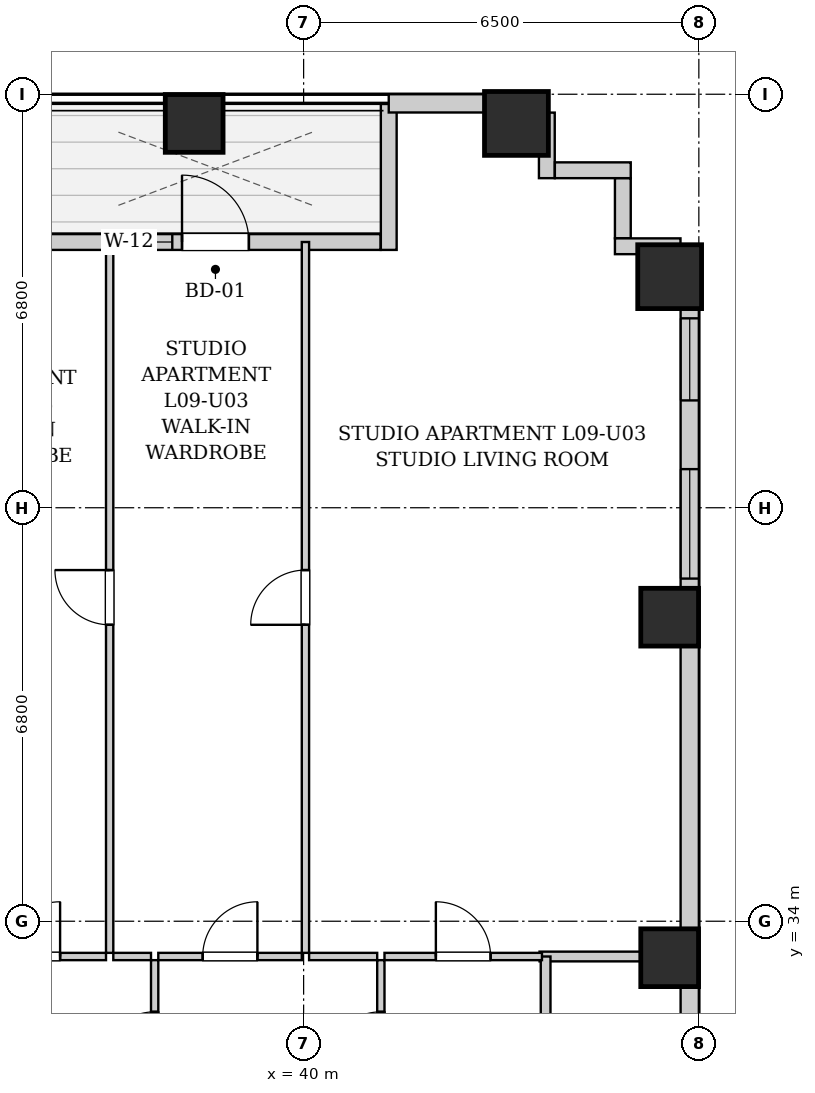
"""IFC4 building model, lengths in metres.
Left out: names, types, materials, properties, quantities, classifications, styles, units other than length and angle.
Written with IfcOpenShell. Run it as: python <this file> out.ifc"""

import sys

from ifc_helpers import new_model, si_unit, direction, frame, frame_2d, origin, origin_2d, place, context, subcontext, project, spatial, rectangle, extrude, element, fill, save


model = new_model("IFC4")
c1 = context("Model", 3, precision=1e-05, world=origin(), true_north=direction((0.0, 1.0)))
c2 = subcontext(c1, "Body", "Model", "MODEL_VIEW")
j1 = project(units=[si_unit("LENGTHUNIT", "METRE"), si_unit("PLANEANGLEUNIT", "RADIAN")], contexts=[c1])
p1 = place(None, origin())
s1 = spatial("IfcSite", under=j1, at=p1, CompositionType="ELEMENT")
p2 = place(p1, origin())
s2 = spatial("IfcBuilding", under=s1, at=p2, CompositionType="ELEMENT")
p3 = place(p2, frame((0.0, 0.0, 38.6)))
s3 = spatial("IfcBuildingStorey", under=s2, at=p3, CompositionType="ELEMENT", Elevation=38.6)
p4 = place(p3, frame((38.2, 47.12, 0.0), z_axis=(0.0, 0.0, 1.0), x_axis=(1.0, 0.0, 0.0)))
e1 = element("IfcColumn", 1, at=p4, inside=s3, PredefinedType="COLUMN", context=c2, shape_type="SweptSolid", body=[
    extrude(rectangle(XDim=0.95, YDim=0.95, at=origin_2d()), origin(), (0.0, 0.0, 1.0), 3.2),
])
p5 = place(p3, frame((43.5, 47.12, 0.0), z_axis=(0.0, 0.0, 1.0), x_axis=(1.0, 0.0, 0.0)))
e2 = element("IfcColumn", 2, at=p5, inside=s3, PredefinedType="COLUMN", context=c2, shape_type="SweptSolid", body=[
    extrude(rectangle(XDim=1.05, YDim=1.05, at=origin_2d()), origin(), (0.0, 0.0, 1.0), 3.2),
])
for number, where, z_axis, x_axis in (
    (3, (46.02, 33.4, 0.0), (0.0, 0.0, 1.0), (1.0, 0.0, 0.0)),
    (4, (46.02, 39.0, 0.0), (0.0, 0.0, 1.0), (1.0, 0.0, 0.0)),
):
    element("IfcColumn", number, at=place(p3, frame(where, z_axis=z_axis, x_axis=x_axis)), inside=s3, PredefinedType="COLUMN", context=c2, shape_type="SweptSolid", body=[
        extrude(rectangle(XDim=0.95, YDim=0.95, at=origin_2d()), origin(), (0.0, 0.0, 1.0), 3.2),
    ])
p6 = place(p3, frame((46.02, 44.6, 0.0), z_axis=(0.0, 0.0, 1.0), x_axis=(1.0, 0.0, 0.0)))
e5 = element("IfcColumn", 5, at=p6, inside=s3, PredefinedType="COLUMN", context=c2, shape_type="SweptSolid", body=[
    extrude(rectangle(XDim=1.05, YDim=1.05, at=origin_2d()), origin(), (0.0, 0.0, 1.0), 3.2),
])
p7 = place(p3, frame((35.834, 45.17, 0.0), z_axis=(0.0, 0.0, 1.0), x_axis=(1.0, 0.0, 0.0)))
e6 = element("IfcWall", 6, at=p7, inside=s3, PredefinedType="SOLIDWALL", context=c2, shape_type="SweptSolid", body=[
    extrude(rectangle(XDim=5.432, YDim=0.26, at=frame_2d((2.716, 0.0))), origin(), (0.0, 0.0, 1.0), 2.94),
])
p8 = place(p7, frame((2.166, 0.0, 0.0)))
e7 = element("IfcOpeningElement", 7, at=p8, cuts=e6, PredefinedType="OPENING", context=c2, shape_type="SweptSolid", body=[
    extrude(rectangle(XDim=1.1, YDim=2.0, at=frame_2d((0.55, 1.0))), frame((0.0, 0.14, 0.0), z_axis=(0.0, -1.0, 0.0), x_axis=(1.0, 0.0, 0.0)), (0.0, 0.0, 1.0), 0.28),
])
p9 = place(p7, frame((1.326, 0.0, 0.55)))
e8 = element("IfcOpeningElement", 8, at=p9, cuts=e6, PredefinedType="OPENING", context=c2, shape_type="SweptSolid", body=[
    extrude(rectangle(XDim=0.68, YDim=1.2, at=frame_2d((0.34, 0.6))), frame((0.0, 0.14, 0.0), z_axis=(0.0, -1.0, 0.0), x_axis=(1.0, 0.0, 0.0)), (0.0, 0.0, 1.0), 0.28),
])
p10 = place(p3, frame((41.4, 45.04, 0.0), z_axis=(0.0, 0.0, 1.0), x_axis=(0.0, 1.0, 0.0)))
e9 = element("IfcWall", 9, at=p10, inside=s3, PredefinedType="SOLIDWALL", context=c2, shape_type="SweptSolid", body=[
    extrude(rectangle(XDim=2.4, YDim=0.26, at=frame_2d((1.2, 0.0))), origin(), (0.0, 0.0, 1.0), 2.94),
])
p11 = place(p3, frame((41.4, 47.45, 0.0), z_axis=(0.0, 0.0, 1.0), x_axis=(1.0, 0.0, 0.0)))
e10 = element("IfcWall", 10, at=p11, inside=s3, PredefinedType="SOLIDWALL", context=c2, shape_type="SweptSolid", body=[
    extrude(rectangle(XDim=2.6, YDim=0.3, at=frame_2d((1.3, 0.0))), origin(), (0.0, 0.0, 1.0), 1.975),
])
p12 = place(p3, frame((46.35, 45.1, 0.0), z_axis=(0.0, 0.0, 1.0), x_axis=(0.0, -1.0, 0.0)))
e11 = element("IfcWall", 11, at=p12, inside=s3, PredefinedType="SOLIDWALL", context=c2, shape_type="SweptSolid", body=[
    extrude(rectangle(XDim=42.6, YDim=0.3, at=frame_2d((21.3, 0.0))), origin(), (0.0, 0.0, 1.0), 1.975),
])
p13 = place(p12, frame((37.575, 0.0, 0.55)))
e12 = element("IfcOpeningElement", 12, at=p13, cuts=e11, PredefinedType="OPENING", context=c2, shape_type="SweptSolid", body=[
    extrude(rectangle(XDim=1.8, YDim=1.2, at=frame_2d((0.9, 0.6))), frame((0.0, 0.16, 0.0), z_axis=(0.0, -1.0, 0.0), x_axis=(1.0, 0.0, 0.0)), (0.0, 0.0, 1.0), 0.32),
])
p14 = place(p12, frame((34.85, 0.0, 0.55)))
e13 = element("IfcOpeningElement", 13, at=p14, cuts=e11, PredefinedType="OPENING", context=c2, shape_type="SweptSolid", body=[
    extrude(rectangle(XDim=1.35, YDim=1.2, at=frame_2d((0.675, 0.6))), frame((0.0, 0.16, 0.0), z_axis=(0.0, -1.0, 0.0), x_axis=(1.0, 0.0, 0.0)), (0.0, 0.0, 1.0), 0.32),
])
p15 = place(p12, frame((3.665, 0.0, 0.55)))
e14 = element("IfcOpeningElement", 14, at=p15, cuts=e11, PredefinedType="OPENING", context=c2, shape_type="SweptSolid", body=[
    extrude(rectangle(XDim=1.8, YDim=1.2, at=frame_2d((0.9, 0.6))), frame((0.0, 0.16, 0.0), z_axis=(0.0, -1.0, 0.0), x_axis=(1.0, 0.0, 0.0)), (0.0, 0.0, 1.0), 0.32),
])
p16 = place(p12, frame((1.185, 0.0, 0.55)))
e15 = element("IfcOpeningElement", 15, at=p16, cuts=e11, PredefinedType="OPENING", context=c2, shape_type="SweptSolid", body=[
    extrude(rectangle(XDim=1.35, YDim=1.2, at=frame_2d((0.675, 0.6))), frame((0.0, 0.16, 0.0), z_axis=(0.0, -1.0, 0.0), x_axis=(1.0, 0.0, 0.0)), (0.0, 0.0, 1.0), 0.32),
])
p17 = place(p12, frame((27.225, 0.0, 0.55)))
e16 = element("IfcOpeningElement", 16, at=p17, cuts=e11, PredefinedType="OPENING", context=c2, shape_type="SweptSolid", body=[
    extrude(rectangle(XDim=1.8, YDim=1.2, at=frame_2d((0.9, 0.6))), frame((0.0, 0.16, 0.0), z_axis=(0.0, -1.0, 0.0), x_axis=(1.0, 0.0, 0.0)), (0.0, 0.0, 1.0), 0.32),
])
p18 = place(p12, frame((17.1, 0.0, 0.55)))
e17 = element("IfcOpeningElement", 17, at=p18, cuts=e11, PredefinedType="OPENING", context=c2, shape_type="SweptSolid", body=[
    extrude(rectangle(XDim=1.8, YDim=1.2, at=frame_2d((0.9, 0.6))), frame((0.0, 0.16, 0.0), z_axis=(0.0, -1.0, 0.0), x_axis=(1.0, 0.0, 0.0)), (0.0, 0.0, 1.0), 0.32),
])
p19 = place(p3, frame((44.0, 47.298, 0.0), z_axis=(0.0, 0.0, 1.0), x_axis=(0.0, -1.0, 0.0)))
e18 = element("IfcWall", 18, at=p19, inside=s3, PredefinedType="SOLIDWALL", context=c2, shape_type="SweptSolid", body=[
    extrude(rectangle(XDim=1.078, YDim=0.26, at=frame_2d((0.539, 0.0))), origin(), (0.0, 0.0, 1.0), 2.94),
])
p20 = place(p3, frame((44.132, 46.35, 0.0), z_axis=(0.0, 0.0, 1.0), x_axis=(1.0, 0.0, 0.0)))
e19 = element("IfcWall", 19, at=p20, inside=s3, PredefinedType="SOLIDWALL", context=c2, shape_type="SweptSolid", body=[
    extrude(rectangle(XDim=1.248, YDim=0.26, at=frame_2d((0.624, 0.0))), origin(), (0.0, 0.0, 1.0), 2.94),
])
p21 = place(p3, frame((45.25, 46.218, 0.0), z_axis=(0.0, 0.0, 1.0), x_axis=(0.0, -1.0, 0.0)))
e20 = element("IfcWall", 20, at=p21, inside=s3, PredefinedType="SOLIDWALL", context=c2, shape_type="SweptSolid", body=[
    extrude(rectangle(XDim=0.986, YDim=0.26, at=frame_2d((0.493, 0.0))), origin(), (0.0, 0.0, 1.0), 2.94),
])
p22 = place(p3, frame((45.12, 45.1, 0.0), z_axis=(0.0, 0.0, 1.0), x_axis=(1.0, 0.0, 0.0)))
e21 = element("IfcWall", 21, at=p22, inside=s3, PredefinedType="SOLIDWALL", context=c2, shape_type="SweptSolid", body=[
    extrude(rectangle(XDim=1.078, YDim=0.26, at=frame_2d((0.539, 0.0))), origin(), (0.0, 0.0, 1.0), 2.94),
])
p23 = place(p3, frame((43.88, 33.42, 0.0), z_axis=(0.0, 0.0, 1.0), x_axis=(1.0, 0.0, 0.0)))
e22 = element("IfcWall", 22, at=p23, inside=s3, PredefinedType="PARTITIONING", context=c2, shape_type="SweptSolid", body=[
    extrude(rectangle(XDim=2.34, YDim=0.16, at=frame_2d((1.17, 0.0))), origin(), (0.0, 0.0, 1.0), 2.94),
])
p24 = place(p3, frame((43.98, 30.76, 0.0), z_axis=(0.0, 0.0, 1.0), x_axis=(0.0, 1.0, 0.0)))
e23 = element("IfcWall", 23, at=p24, inside=s3, PredefinedType="PARTITIONING", context=c2, shape_type="SweptSolid", body=[
    extrude(rectangle(XDim=2.66, YDim=0.16, at=frame_2d((1.33, 0.0))), origin(), (0.0, 0.0, 1.0), 2.94),
])
p25 = place(p3, frame((37.55, 30.76, 0.0), z_axis=(0.0, 0.0, 1.0), x_axis=(0.0, 1.0, 0.0)))
e24 = element("IfcWall", 24, at=p25, inside=s3, PredefinedType="PARTITIONING", context=c2, shape_type="SweptSolid", body=[
    extrude(rectangle(XDim=2.6, YDim=0.12, at=frame_2d((1.3, 0.0))), origin(), (0.0, 0.0, 1.0), 2.94),
])
p26 = place(p25, frame((0.85, 0.0, 0.0)))
e25 = element("IfcOpeningElement", 25, at=p26, cuts=e24, PredefinedType="OPENING", context=c2, shape_type="SweptSolid", body=[
    extrude(rectangle(XDim=0.9, YDim=2.05, at=frame_2d((0.45, 1.025))), frame((0.0, 0.07, 0.0), z_axis=(0.0, -1.0, 0.0), x_axis=(1.0, 0.0, 0.0)), (0.0, 0.0, 1.0), 0.14),
])
p27 = place(p3, frame((34.34, 33.42, 0.0), z_axis=(0.0, 0.0, 1.0), x_axis=(1.0, 0.0, 0.0)))
e26 = element("IfcWall", 26, at=p27, inside=s3, PredefinedType="PARTITIONING", context=c2, shape_type="SweptSolid", body=[
    extrude(rectangle(XDim=2.41, YDim=0.12, at=frame_2d((1.205, 0.0))), origin(), (0.0, 0.0, 1.0), 2.94),
])
p28 = place(p27, frame((0.755, 0.0, 0.0)))
e27 = element("IfcOpeningElement", 27, at=p28, cuts=e26, PredefinedType="OPENING", context=c2, shape_type="SweptSolid", body=[
    extrude(rectangle(XDim=0.9, YDim=2.05, at=frame_2d((0.45, 1.025))), frame((0.0, 0.07, 0.0), z_axis=(0.0, -1.0, 0.0), x_axis=(1.0, 0.0, 0.0)), (0.0, 0.0, 1.0), 0.14),
])
p29 = place(p3, frame((36.87, 33.42, 0.0), z_axis=(0.0, 0.0, 1.0), x_axis=(1.0, 0.0, 0.0)))
e28 = element("IfcWall", 28, at=p29, inside=s3, PredefinedType="PARTITIONING", context=c2, shape_type="SweptSolid", body=[
    extrude(rectangle(XDim=0.62, YDim=0.12, at=frame_2d((0.31, 0.0))), origin(), (0.0, 0.0, 1.0), 2.94),
])
p30 = place(p3, frame((41.27, 30.76, 0.0), z_axis=(0.0, 0.0, 1.0), x_axis=(0.0, 1.0, 0.0)))
e29 = element("IfcWall", 29, at=p30, inside=s3, PredefinedType="PARTITIONING", context=c2, shape_type="SweptSolid", body=[
    extrude(rectangle(XDim=2.6, YDim=0.12, at=frame_2d((1.3, 0.0))), origin(), (0.0, 0.0, 1.0), 2.94),
])
p31 = place(p30, frame((0.85, 0.0, 0.0)))
e30 = element("IfcOpeningElement", 30, at=p31, cuts=e29, PredefinedType="OPENING", context=c2, shape_type="SweptSolid", body=[
    extrude(rectangle(XDim=0.9, YDim=2.05, at=frame_2d((0.45, 1.025))), frame((0.0, 0.07, 0.0), z_axis=(0.0, -1.0, 0.0), x_axis=(1.0, 0.0, 0.0)), (0.0, 0.0, 1.0), 0.14),
])
p32 = place(p3, frame((37.61, 33.42, 0.0), z_axis=(0.0, 0.0, 1.0), x_axis=(1.0, 0.0, 0.0)))
e31 = element("IfcWall", 31, at=p32, inside=s3, PredefinedType="PARTITIONING", context=c2, shape_type="SweptSolid", body=[
    extrude(rectangle(XDim=2.36, YDim=0.12, at=frame_2d((1.18, 0.0))), origin(), (0.0, 0.0, 1.0), 2.94),
])
p33 = place(p32, frame((0.73, 0.0, 0.0)))
e32 = element("IfcOpeningElement", 32, at=p33, cuts=e31, PredefinedType="OPENING", context=c2, shape_type="SweptSolid", body=[
    extrude(rectangle(XDim=0.9, YDim=2.05, at=frame_2d((0.45, 1.025))), frame((0.0, 0.07, 0.0), z_axis=(0.0, -1.0, 0.0), x_axis=(1.0, 0.0, 0.0)), (0.0, 0.0, 1.0), 0.14),
])
p34 = place(p3, frame((40.09, 33.42, 0.0), z_axis=(0.0, 0.0, 1.0), x_axis=(1.0, 0.0, 0.0)))
e33 = element("IfcWall", 33, at=p34, inside=s3, PredefinedType="PARTITIONING", context=c2, shape_type="SweptSolid", body=[
    extrude(rectangle(XDim=1.12, YDim=0.12, at=frame_2d((0.56, 0.0))), origin(), (0.0, 0.0, 1.0), 2.94),
])
p35 = place(p3, frame((41.33, 33.42, 0.0), z_axis=(0.0, 0.0, 1.0), x_axis=(1.0, 0.0, 0.0)))
e34 = element("IfcWall", 34, at=p35, inside=s3, PredefinedType="PARTITIONING", context=c2, shape_type="SweptSolid", body=[
    extrude(rectangle(XDim=2.59, YDim=0.12, at=frame_2d((1.295, 0.0))), origin(), (0.0, 0.0, 1.0), 2.94),
])
p36 = place(p35, frame((0.845, 0.0, 0.0)))
e35 = element("IfcOpeningElement", 35, at=p36, cuts=e34, PredefinedType="OPENING", context=c2, shape_type="SweptSolid", body=[
    extrude(rectangle(XDim=0.9, YDim=2.05, at=frame_2d((0.45, 1.025))), frame((0.0, 0.07, 0.0), z_axis=(0.0, -1.0, 0.0), x_axis=(1.0, 0.0, 0.0)), (0.0, 0.0, 1.0), 0.14),
])
p37 = place(p3, frame((36.81, 33.48, 0.0), z_axis=(0.0, 0.0, 1.0), x_axis=(0.0, 1.0, 0.0)))
e36 = element("IfcWall", 36, at=p37, inside=s3, PredefinedType="PARTITIONING", context=c2, shape_type="SweptSolid", body=[
    extrude(rectangle(XDim=11.69, YDim=0.12, at=frame_2d((5.845, 0.0))), origin(), (0.0, 0.0, 1.0), 2.94),
])
p38 = place(p37, frame((5.395, 0.0, 0.0)))
e37 = element("IfcOpeningElement", 37, at=p38, cuts=e36, PredefinedType="OPENING", context=c2, shape_type="SweptSolid", body=[
    extrude(rectangle(XDim=0.9, YDim=2.05, at=frame_2d((0.45, 1.025))), frame((0.0, 0.07, 0.0), z_axis=(0.0, -1.0, 0.0), x_axis=(1.0, 0.0, 0.0)), (0.0, 0.0, 1.0), 0.14),
])
p39 = place(p3, frame((40.03, 33.48, 0.0), z_axis=(0.0, 0.0, 1.0), x_axis=(0.0, 1.0, 0.0)))
e38 = element("IfcWall", 38, at=p39, inside=s3, PredefinedType="PARTITIONING", context=c2, shape_type="SweptSolid", body=[
    extrude(rectangle(XDim=11.69, YDim=0.12, at=frame_2d((5.845, 0.0))), origin(), (0.0, 0.0, 1.0), 2.94),
])
p40 = place(p39, frame((5.395, 0.0, 0.0)))
e39 = element("IfcOpeningElement", 39, at=p40, cuts=e38, PredefinedType="OPENING", context=c2, shape_type="SweptSolid", body=[
    extrude(rectangle(XDim=0.9, YDim=2.05, at=frame_2d((0.45, 1.025))), frame((0.0, 0.07, 0.0), z_axis=(0.0, -1.0, 0.0), x_axis=(1.0, 0.0, 0.0)), (0.0, 0.0, 1.0), 0.14),
])
p41 = place(p26, origin())
e40 = element("IfcDoor", 40, at=p41, inside=s3, OperationType="SINGLE_SWING_LEFT", PredefinedType="DOOR", context=c2, shape_type="SweptSolid", body=[
    extrude(rectangle(XDim=0.9, YDim=2.05, at=frame_2d((0.45, 1.025))), frame((0.0, 0.025, 0.0), z_axis=(0.0, -1.0, 0.0), x_axis=(1.0, 0.0, 0.0)), (0.0, 0.0, 1.0), 0.05),
])
fill(e25, e40)
p42 = place(p28, origin())
e41 = element("IfcDoor", 41, at=p42, inside=s3, OperationType="SINGLE_SWING_RIGHT", PredefinedType="DOOR", context=c2, shape_type="SweptSolid", body=[
    extrude(rectangle(XDim=0.9, YDim=2.05, at=frame_2d((0.45, 1.025))), frame((0.0, 0.025, 0.0), z_axis=(0.0, -1.0, 0.0), x_axis=(1.0, 0.0, 0.0)), (0.0, 0.0, 1.0), 0.05),
])
fill(e27, e41)
p43 = place(p31, origin())
e42 = element("IfcDoor", 42, at=p43, inside=s3, OperationType="SINGLE_SWING_LEFT", PredefinedType="DOOR", context=c2, shape_type="SweptSolid", body=[
    extrude(rectangle(XDim=0.9, YDim=2.05, at=frame_2d((0.45, 1.025))), frame((0.0, 0.025, 0.0), z_axis=(0.0, -1.0, 0.0), x_axis=(1.0, 0.0, 0.0)), (0.0, 0.0, 1.0), 0.05),
])
fill(e30, e42)
p44 = place(p33, origin())
e43 = element("IfcDoor", 43, at=p44, inside=s3, OperationType="SINGLE_SWING_RIGHT", PredefinedType="DOOR", context=c2, shape_type="SweptSolid", body=[
    extrude(rectangle(XDim=0.9, YDim=2.05, at=frame_2d((0.45, 1.025))), frame((0.0, 0.025, 0.0), z_axis=(0.0, -1.0, 0.0), x_axis=(1.0, 0.0, 0.0)), (0.0, 0.0, 1.0), 0.05),
])
fill(e32, e43)
p45 = place(p36, origin())
e44 = element("IfcDoor", 44, at=p45, inside=s3, OperationType="SINGLE_SWING_LEFT", PredefinedType="DOOR", context=c2, shape_type="SweptSolid", body=[
    extrude(rectangle(XDim=0.9, YDim=2.05, at=frame_2d((0.45, 1.025))), frame((0.0, 0.025, 0.0), z_axis=(0.0, -1.0, 0.0), x_axis=(1.0, 0.0, 0.0)), (0.0, 0.0, 1.0), 0.05),
])
fill(e35, e44)
p46 = place(p38, origin())
e45 = element("IfcDoor", 45, at=p46, inside=s3, OperationType="SINGLE_SWING_RIGHT", PredefinedType="DOOR", context=c2, shape_type="SweptSolid", body=[
    extrude(rectangle(XDim=0.9, YDim=2.05, at=frame_2d((0.45, 1.025))), frame((0.0, 0.025, 0.0), z_axis=(0.0, -1.0, 0.0), x_axis=(1.0, 0.0, 0.0)), (0.0, 0.0, 1.0), 0.05),
])
fill(e37, e45)
p47 = place(p40, origin())
e46 = element("IfcDoor", 46, at=p47, inside=s3, OperationType="SINGLE_SWING_LEFT", PredefinedType="DOOR", context=c2, shape_type="SweptSolid", body=[
    extrude(rectangle(XDim=0.9, YDim=2.05, at=frame_2d((0.45, 1.025))), frame((0.0, 0.025, 0.0), z_axis=(0.0, -1.0, 0.0), x_axis=(1.0, 0.0, 0.0)), (0.0, 0.0, 1.0), 0.05),
])
fill(e39, e46)
p48 = place(p8, origin())
e47 = element("IfcDoor", 47, at=p48, inside=s3, OperationType="SINGLE_SWING_LEFT", PredefinedType="DOOR", context=c2, shape_type="SweptSolid", body=[
    extrude(rectangle(XDim=1.1, YDim=2.0, at=frame_2d((0.55, 1.0))), frame((0.0, 0.025, 0.0), z_axis=(0.0, -1.0, 0.0), x_axis=(1.0, 0.0, 0.0)), (0.0, 0.0, 1.0), 0.05),
])
fill(e7, e47)
p49 = place(p9, origin())
e48 = element("IfcWindow", 48, at=p49, inside=s3, PartitioningType="SINGLE_PANEL", PredefinedType="WINDOW", context=c2, shape_type="SweptSolid", body=[
    extrude(rectangle(XDim=0.68, YDim=1.2, at=frame_2d((0.34, 0.6))), frame((0.0, 0.03, 0.0), z_axis=(0.0, -1.0, 0.0), x_axis=(1.0, 0.0, 0.0)), (0.0, 0.0, 1.0), 0.06),
])
fill(e8, e48)
p50 = place(p15, origin())
e49 = element("IfcWindow", 49, at=p50, inside=s3, PartitioningType="DOUBLE_PANEL_VERTICAL", PredefinedType="WINDOW", context=c2, shape_type="SweptSolid", body=[
    extrude(rectangle(XDim=1.8, YDim=1.2, at=frame_2d((0.9, 0.6))), frame((0.0, 0.03, 0.0), z_axis=(0.0, -1.0, 0.0), x_axis=(1.0, 0.0, 0.0)), (0.0, 0.0, 1.0), 0.06),
])
fill(e14, e49)
p51 = place(p16, origin())
e50 = element("IfcWindow", 50, at=p51, inside=s3, PartitioningType="SINGLE_PANEL", PredefinedType="WINDOW", context=c2, shape_type="SweptSolid", body=[
    extrude(rectangle(XDim=1.35, YDim=1.2, at=frame_2d((0.675, 0.6))), frame((0.0, 0.03, 0.0), z_axis=(0.0, -1.0, 0.0), x_axis=(1.0, 0.0, 0.0)), (0.0, 0.0, 1.0), 0.06),
])
fill(e15, e50)
save(model, sys.argv[1])
